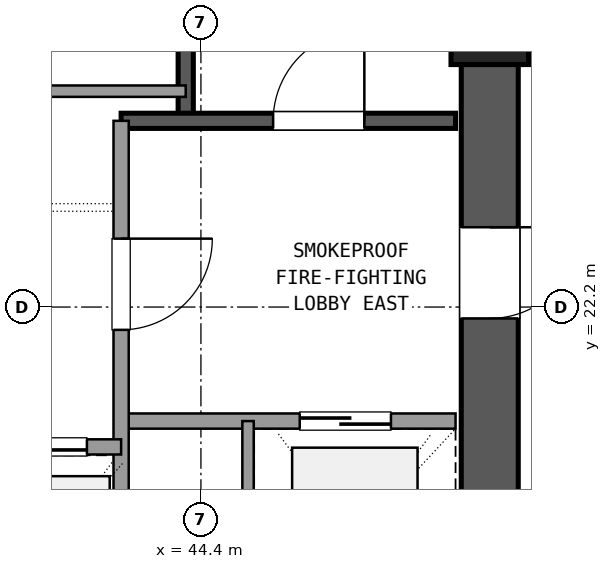
"""IFC4 building model, lengths in metres.
Left out: names, types, materials, properties, quantities, classifications, styles, units other than length and angle.
Written with IfcOpenShell. Run it as: python <this file> out.ifc"""

import sys

from ifc_helpers import new_model, si_unit, direction, frame, frame_2d, origin, origin_2d, place, context, subcontext, project, spatial, rectangle, extrude, element, fill, save


model = new_model("IFC4")
c1 = context("Model", 3, precision=1e-05, world=origin(), true_north=direction((0.0, 1.0)))
c2 = subcontext(c1, "Body", "Model", "MODEL_VIEW")
j1 = project(units=[si_unit("LENGTHUNIT", "METRE"), si_unit("PLANEANGLEUNIT", "RADIAN")], contexts=[c1])
p1 = place(None, origin())
s1 = spatial("IfcSite", under=j1, at=p1, CompositionType="ELEMENT")
p2 = place(p1, origin())
s2 = spatial("IfcBuilding", under=s1, at=p2, CompositionType="ELEMENT")
p3 = place(p2, frame((0.0, 0.0, 106.38)))
s3 = spatial("IfcBuildingStorey", under=s2, at=p3, CompositionType="ELEMENT", Elevation=106.38)
p4 = place(p3, frame((48.2, 25.9, 0.0), z_axis=(0.0, 0.0, 1.0), x_axis=(1.0, 0.0, 0.0)))
e1 = element("IfcColumn", 1, at=p4, inside=s3, PredefinedType="COLUMN", context=c2, shape_type="SweptSolid", body=[
    extrude(rectangle(XDim=1.02, YDim=1.02, at=origin_2d()), origin(), (0.0, 0.0, 1.0), 3.6),
])
p5 = place(p3, frame((48.2, 17.805, 0.0), z_axis=(0.0, 0.0, 1.0), x_axis=(0.0, 1.0, 0.0)))
e2 = element("IfcWall", 2, at=p5, inside=s3, PredefinedType="SHEAR", context=c2, shape_type="SweptSolid", body=[
    extrude(rectangle(XDim=7.59, YDim=0.75, at=frame_2d((3.795, 0.0))), origin(), (0.0, 0.0, 1.0), 3.32),
])
p6 = place(p5, frame((4.245, 0.0, 0.0)))
e3 = element("IfcOpeningElement", 3, at=p6, cuts=e2, PredefinedType="OPENING", context=c2, shape_type="SweptSolid", body=[
    extrude(rectangle(XDim=1.2, YDim=2.15, at=frame_2d((0.6, 1.075))), frame((0.0, 0.385, 0.0), z_axis=(0.0, -1.0, 0.0), x_axis=(1.0, 0.0, 0.0)), (0.0, 0.0, 1.0), 0.77),
])
p7 = place(p3, frame((44.2, 24.65, 0.0), z_axis=(0.0, 0.0, 1.0), x_axis=(0.0, 1.0, 0.0)))
e4 = element("IfcWall", 4, at=p7, inside=s3, PredefinedType="SHEAR", context=c2, shape_type="SweptSolid", body=[
    extrude(rectangle(XDim=9.4, YDim=0.2, at=frame_2d((4.7, 0.0))), origin(), (0.0, 0.0, 1.0), 3.32),
])
p8 = place(p3, frame((43.35, 24.65, 0.0), z_axis=(0.0, 0.0, 1.0), x_axis=(1.0, 0.0, 0.0)))
e5 = element("IfcWall", 5, at=p8, inside=s3, PredefinedType="SHEAR", context=c2, shape_type="SweptSolid", body=[
    extrude(rectangle(XDim=4.4, YDim=0.2, at=frame_2d((2.2, 0.0))), origin(), (0.0, 0.0, 1.0), 3.32),
])
p9 = place(p8, frame((2.0, 0.0, 0.0)))
e6 = element("IfcOpeningElement", 6, at=p9, cuts=e5, PredefinedType="OPENING", context=c2, shape_type="SweptSolid", body=[
    extrude(rectangle(XDim=1.2, YDim=2.15, at=frame_2d((0.6, 1.075))), frame((0.0, 0.11, 0.0), z_axis=(0.0, -1.0, 0.0), x_axis=(1.0, 0.0, 0.0)), (0.0, 0.0, 1.0), 0.22),
])
p10 = place(p3, frame((43.35, 20.7, 0.0), z_axis=(0.0, 0.0, 1.0), x_axis=(1.0, 0.0, 0.0)))
e7 = element("IfcWall", 7, at=p10, inside=s3, PredefinedType="SOLIDWALL", context=c2, shape_type="SweptSolid", body=[
    extrude(rectangle(XDim=4.4, YDim=0.2, at=frame_2d((2.2, 0.0))), origin(), (0.0, 0.0, 1.0), 2.61),
])
p11 = place(p10, frame((2.35, 0.0, 0.0)))
e8 = element("IfcOpeningElement", 8, at=p11, cuts=e7, PredefinedType="OPENING", context=c2, shape_type="SweptSolid", body=[
    extrude(rectangle(XDim=1.2, YDim=2.15, at=frame_2d((0.6, 1.075))), frame((0.0, 0.11, 0.0), z_axis=(0.0, -1.0, 0.0), x_axis=(1.0, 0.0, 0.0)), (0.0, 0.0, 1.0), 0.22),
])
p12 = place(p3, frame((43.35, 17.75, 0.0), z_axis=(0.0, 0.0, 1.0), x_axis=(0.0, 1.0, 0.0)))
e9 = element("IfcWall", 9, at=p12, inside=s3, PredefinedType="SOLIDWALL", context=c2, shape_type="SweptSolid", body=[
    extrude(rectangle(XDim=6.9, YDim=0.2, at=frame_2d((3.45, 0.0))), origin(), (0.0, 0.0, 1.0), 2.61),
])
p13 = place(p12, frame((4.15, 0.0, 0.0)))
e10 = element("IfcOpeningElement", 10, at=p13, cuts=e9, PredefinedType="OPENING", context=c2, shape_type="SweptSolid", body=[
    extrude(rectangle(XDim=1.2, YDim=2.15, at=frame_2d((0.6, 1.075))), frame((0.0, 0.11, 0.0), z_axis=(0.0, -1.0, 0.0), x_axis=(1.0, 0.0, 0.0)), (0.0, 0.0, 1.0), 0.22),
])
p14 = place(p3, frame((45.02, 17.75, 0.0), z_axis=(0.0, 0.0, 1.0), x_axis=(0.0, 1.0, 0.0)))
e11 = element("IfcWall", 11, at=p14, inside=s3, PredefinedType="PARTITIONING", context=c2, shape_type="SweptSolid", body=[
    extrude(rectangle(XDim=2.95, YDim=0.15, at=frame_2d((1.475, 0.0))), origin(), (0.0, 0.0, 1.0), 2.61),
])
p15 = place(p3, frame((37.25, 20.36, 0.0), z_axis=(0.0, 0.0, 1.0), x_axis=(1.0, 0.0, 0.0)))
e12 = element("IfcWall", 12, at=p15, inside=s3, PredefinedType="SOLIDWALL", context=c2, shape_type="SweptSolid", body=[
    extrude(rectangle(XDim=6.1, YDim=0.2, at=frame_2d((3.05, 0.0))), origin(), (0.0, 0.0, 1.0), 2.61),
])
p16 = place(p15, frame((0.45, 0.0, 0.0)))
e13 = element("IfcOpeningElement", 13, at=p16, cuts=e12, PredefinedType="OPENING", context=c2, shape_type="SweptSolid", body=[
    extrude(rectangle(XDim=1.1, YDim=2.15, at=frame_2d((0.55, 1.075))), frame((0.0, 0.11, 0.0), z_axis=(0.0, -1.0, 0.0), x_axis=(1.0, 0.0, 0.0)), (0.0, 0.0, 1.0), 0.22),
])
p17 = place(p15, frame((2.5, 0.0, 0.0)))
e14 = element("IfcOpeningElement", 14, at=p17, cuts=e12, PredefinedType="OPENING", context=c2, shape_type="SweptSolid", body=[
    extrude(rectangle(XDim=1.1, YDim=2.15, at=frame_2d((0.55, 1.075))), frame((0.0, 0.11, 0.0), z_axis=(0.0, -1.0, 0.0), x_axis=(1.0, 0.0, 0.0)), (0.0, 0.0, 1.0), 0.22),
])
p18 = place(p15, frame((4.55, 0.0, 0.0)))
e15 = element("IfcOpeningElement", 15, at=p18, cuts=e12, PredefinedType="OPENING", context=c2, shape_type="SweptSolid", body=[
    extrude(rectangle(XDim=1.1, YDim=2.15, at=frame_2d((0.55, 1.075))), frame((0.0, 0.11, 0.0), z_axis=(0.0, -1.0, 0.0), x_axis=(1.0, 0.0, 0.0)), (0.0, 0.0, 1.0), 0.22),
])
p19 = place(p3, frame((42.27, 25.04, 0.0), z_axis=(0.0, 0.0, 1.0), x_axis=(1.0, 0.0, 0.0)))
e16 = element("IfcWall", 16, at=p19, inside=s3, PredefinedType="PARTITIONING", context=c2, shape_type="SweptSolid", body=[
    extrude(rectangle(XDim=1.93, YDim=0.15, at=frame_2d((0.965, 0.0))), origin(), (0.0, 0.0, 1.0), 2.61),
])
p20 = place(p9, origin())
e17 = element("IfcDoor", 17, at=p20, inside=s3, OperationType="SINGLE_SWING_RIGHT", PredefinedType="DOOR", context=c2, shape_type="SweptSolid", body=[
    extrude(rectangle(XDim=1.2, YDim=2.15, at=frame_2d((0.6, 1.075))), frame((0.0, 0.025, 0.0), z_axis=(0.0, -1.0, 0.0), x_axis=(1.0, 0.0, 0.0)), (0.0, 0.0, 1.0), 0.05),
])
fill(e6, e17)
p21 = place(p11, origin())
e18 = element("IfcDoor", 18, at=p21, inside=s3, OperationType="SLIDING_TO_RIGHT", PredefinedType="DOOR", context=c2, shape_type="SweptSolid", body=[
    extrude(rectangle(XDim=1.2, YDim=2.15, at=frame_2d((0.6, 1.075))), frame((0.0, 0.025, 0.0), z_axis=(0.0, -1.0, 0.0), x_axis=(1.0, 0.0, 0.0)), (0.0, 0.0, 1.0), 0.05),
])
fill(e8, e18)
p22 = place(p13, frame((1.2, 0.0, 0.0), z_axis=(0.0, 0.0, 1.0), x_axis=(-1.0, 0.0, 0.0)))
e19 = element("IfcDoor", 19, at=p22, inside=s3, OperationType="SINGLE_SWING_RIGHT", PredefinedType="DOOR", context=c2, shape_type="SweptSolid", body=[
    extrude(rectangle(XDim=1.2, YDim=2.15, at=frame_2d((0.6, 1.075))), frame((0.0, 0.025, 0.0), z_axis=(0.0, -1.0, 0.0), x_axis=(1.0, 0.0, 0.0)), (0.0, 0.0, 1.0), 0.05),
])
fill(e10, e19)
p23 = place(p6, frame((1.2, 0.0, 0.0), z_axis=(0.0, 0.0, 1.0), x_axis=(-1.0, 0.0, 0.0)))
e20 = element("IfcDoor", 20, at=p23, inside=s3, OperationType="SINGLE_SWING_RIGHT", PredefinedType="DOOR", context=c2, shape_type="SweptSolid", body=[
    extrude(rectangle(XDim=1.2, YDim=2.15, at=frame_2d((0.6, 1.075))), frame((0.0, 0.025, 0.0), z_axis=(0.0, -1.0, 0.0), x_axis=(1.0, 0.0, 0.0)), (0.0, 0.0, 1.0), 0.05),
])
fill(e3, e20)
p24 = place(p18, origin())
e21 = element("IfcDoor", 21, at=p24, inside=s3, OperationType="SLIDING_TO_LEFT", PredefinedType="DOOR", context=c2, shape_type="SweptSolid", body=[
    extrude(rectangle(XDim=1.1, YDim=2.15, at=frame_2d((0.55, 1.075))), frame((0.0, 0.025, 0.0), z_axis=(0.0, -1.0, 0.0), x_axis=(1.0, 0.0, 0.0)), (0.0, 0.0, 1.0), 0.05),
])
fill(e15, e21)
save(model, sys.argv[1])
